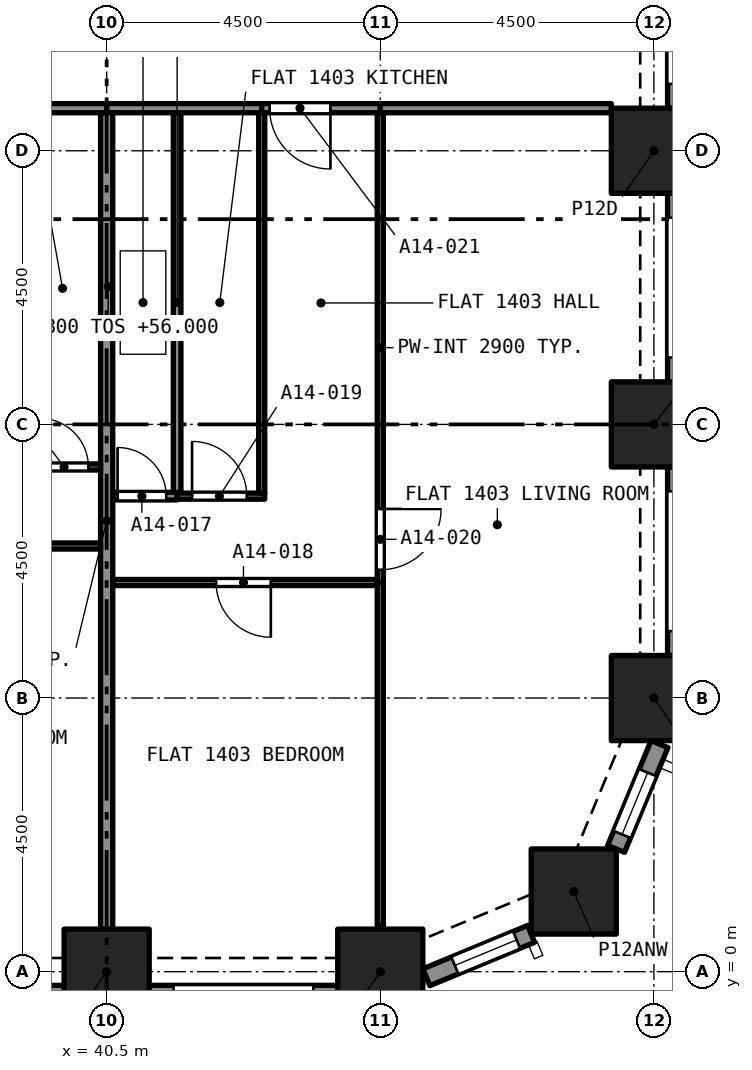
"""IFC4 building model, lengths in metres.
Left out: names, types, materials, properties, quantities, classifications, styles, units other than length and angle.
Written with IfcOpenShell. Run it as: python <this file> out.ifc"""

import sys

from ifc_helpers import new_model, si_unit, direction, frame, frame_2d, origin, origin_2d, place, context, subcontext, project, spatial, rectangle, extrude, element, fill, save


model = new_model("IFC4")
c1 = context("Model", 3, precision=1e-05, world=origin(), true_north=direction((0.0, 1.0)))
c2 = subcontext(c1, "Body", "Model", "MODEL_VIEW")
j1 = project(units=[si_unit("LENGTHUNIT", "METRE"), si_unit("PLANEANGLEUNIT", "RADIAN")], contexts=[c1])
p1 = place(None, origin())
s1 = spatial("IfcSite", under=j1, at=p1, CompositionType="ELEMENT")
p2 = place(p1, origin())
s2 = spatial("IfcBuilding", under=s1, at=p2, CompositionType="ELEMENT")
p3 = place(p2, frame((0.0, 0.0, 56.0)))
s3 = spatial("IfcBuildingStorey", under=s2, at=p3, CompositionType="ELEMENT", Elevation=56.0)
for number, where, z_axis, x_axis in (
    (1, (40.5, 0.0, 0.0), (0.0, 0.0, 1.0), (1.0, 0.0, 0.0)),
    (2, (45.0, 0.0, 0.0), (0.0, 0.0, 1.0), (1.0, 0.0, 0.0)),
    (3, (48.182, 1.318, 0.0), (0.0, 0.0, 1.0), (1.0, 0.0, 0.0)),
    (4, (49.5, 4.5, 0.0), (0.0, 0.0, 1.0), (1.0, 0.0, 0.0)),
    (5, (49.5, 9.0, 0.0), (0.0, 0.0, 1.0), (1.0, 0.0, 0.0)),
    (6, (49.5, 13.5, 0.0), (0.0, 0.0, 1.0), (1.0, 0.0, 0.0)),
):
    element("IfcColumn", number, at=place(p3, frame(where, z_axis=z_axis, x_axis=x_axis)), inside=s3, PredefinedType="COLUMN", context=c2, shape_type="SweptSolid", body=[
        extrude(rectangle(XDim=1.4, YDim=1.4, at=origin_2d()), origin(), (0.0, 0.0, 1.0), 3.2),
    ])
p4 = place(p3, frame((39.8, -0.375, 0.0), z_axis=(0.0, 0.0, 1.0), x_axis=(-1.0, 0.0, 0.0)))
e7 = element("IfcWall", 7, at=p4, inside=s3, PredefinedType="SOLIDWALL", context=c2, shape_type="SweptSolid", body=[
    extrude(rectangle(XDim=3.1, YDim=0.3, at=frame_2d((1.55, 0.0))), origin(), (0.0, 0.0, 1.0), 3.2),
])
p5 = place(p4, frame((0.4, 0.0, 0.45)))
e8 = element("IfcOpeningElement", 8, at=p5, cuts=e7, PredefinedType="OPENING", context=c2, shape_type="SweptSolid", body=[
    extrude(rectangle(XDim=2.3, YDim=1.95, at=frame_2d((1.15, 0.975))), frame((0.0, 0.16, 0.0), z_axis=(0.0, -1.0, 0.0), x_axis=(1.0, 0.0, 0.0)), (0.0, 0.0, 1.0), 0.32),
])
p6 = place(p3, frame((44.3, -0.375, 0.0), z_axis=(0.0, 0.0, 1.0), x_axis=(-1.0, 0.0, 0.0)))
e9 = element("IfcWall", 9, at=p6, inside=s3, PredefinedType="SOLIDWALL", context=c2, shape_type="SweptSolid", body=[
    extrude(rectangle(XDim=3.1, YDim=0.3, at=frame_2d((1.55, 0.0))), origin(), (0.0, 0.0, 1.0), 3.2),
])
p7 = place(p6, frame((0.4, 0.0, 0.45)))
e10 = element("IfcOpeningElement", 10, at=p7, cuts=e9, PredefinedType="OPENING", context=c2, shape_type="SweptSolid", body=[
    extrude(rectangle(XDim=2.3, YDim=1.95, at=frame_2d((1.15, 0.975))), frame((0.0, 0.16, 0.0), z_axis=(0.0, -1.0, 0.0), x_axis=(1.0, 0.0, 0.0)), (0.0, 0.0, 1.0), 0.32),
])
p8 = place(p3, frame((47.48, 0.622, 0.0), z_axis=(0.0, 0.0, 1.0), x_axis=(-0.923903565336, -0.38262540684, 0.0)))
e11 = element("IfcWall", 11, at=p8, inside=s3, PredefinedType="SOLIDWALL", context=c2, shape_type="SweptSolid", body=[
    extrude(rectangle(XDim=1.865, YDim=0.3, at=frame_2d((0.933, 0.0))), origin(), (0.0, 0.0, 1.0), 3.2),
])
p9 = place(p8, frame((0.258, 0.0, 0.45)))
e12 = element("IfcOpeningElement", 12, at=p9, cuts=e11, PredefinedType="OPENING", context=c2, shape_type="SweptSolid", body=[
    extrude(rectangle(XDim=1.1, YDim=1.95, at=frame_2d((0.55, 0.975))), frame((0.0, 0.16, 0.0), z_axis=(0.0, -1.0, 0.0), x_axis=(1.0, 0.0, 0.0)), (0.0, 0.0, 1.0), 0.32),
])
p10 = place(p3, frame((49.592, 3.743, 0.0), z_axis=(0.0, 0.0, 1.0), x_axis=(-0.382737135771, -0.923857286003, 0.0)))
e13 = element("IfcWall", 13, at=p10, inside=s3, PredefinedType="SOLIDWALL", context=c2, shape_type="SweptSolid", body=[
    extrude(rectangle(XDim=1.865, YDim=0.3, at=frame_2d((0.933, 0.0))), origin(), (0.0, 0.0, 1.0), 3.2),
])
p11 = place(p10, frame((0.508, 0.0, 0.45)))
e14 = element("IfcOpeningElement", 14, at=p11, cuts=e13, PredefinedType="OPENING", context=c2, shape_type="SweptSolid", body=[
    extrude(rectangle(XDim=1.1, YDim=1.95, at=frame_2d((0.55, 0.975))), frame((0.0, 0.16, 0.0), z_axis=(0.0, -1.0, 0.0), x_axis=(1.0, 0.0, 0.0)), (0.0, 0.0, 1.0), 0.32),
])
p12 = place(p3, frame((49.875, 8.3, 0.0), z_axis=(0.0, 0.0, 1.0), x_axis=(0.0, -1.0, 0.0)))
e15 = element("IfcWall", 15, at=p12, inside=s3, PredefinedType="SOLIDWALL", context=c2, shape_type="SweptSolid", body=[
    extrude(rectangle(XDim=3.1, YDim=0.3, at=frame_2d((1.55, 0.0))), origin(), (0.0, 0.0, 1.0), 3.2),
])
p13 = place(p12, frame((0.4, 0.0, 0.45)))
e16 = element("IfcOpeningElement", 16, at=p13, cuts=e15, PredefinedType="OPENING", context=c2, shape_type="SweptSolid", body=[
    extrude(rectangle(XDim=2.3, YDim=1.95, at=frame_2d((1.15, 0.975))), frame((0.0, 0.16, 0.0), z_axis=(0.0, -1.0, 0.0), x_axis=(1.0, 0.0, 0.0)), (0.0, 0.0, 1.0), 0.32),
])
p14 = place(p3, frame((49.875, 12.8, 0.0), z_axis=(0.0, 0.0, 1.0), x_axis=(0.0, -1.0, 0.0)))
e17 = element("IfcWall", 17, at=p14, inside=s3, PredefinedType="SOLIDWALL", context=c2, shape_type="SweptSolid", body=[
    extrude(rectangle(XDim=3.1, YDim=0.3, at=frame_2d((1.55, 0.0))), origin(), (0.0, 0.0, 1.0), 3.2),
])
p15 = place(p14, frame((0.4, 0.0, 0.45)))
e18 = element("IfcOpeningElement", 18, at=p15, cuts=e17, PredefinedType="OPENING", context=c2, shape_type="SweptSolid", body=[
    extrude(rectangle(XDim=2.3, YDim=1.95, at=frame_2d((1.15, 0.975))), frame((0.0, 0.16, 0.0), z_axis=(0.0, -1.0, 0.0), x_axis=(1.0, 0.0, 0.0)), (0.0, 0.0, 1.0), 0.32),
])
p16 = place(p3, frame((49.875, 17.3, 0.0), z_axis=(0.0, 0.0, 1.0), x_axis=(0.0, -1.0, 0.0)))
e19 = element("IfcWall", 19, at=p16, inside=s3, PredefinedType="SOLIDWALL", context=c2, shape_type="SweptSolid", body=[
    extrude(rectangle(XDim=3.1, YDim=0.3, at=frame_2d((1.55, 0.0))), origin(), (0.0, 0.0, 1.0), 3.2),
])
p17 = place(p16, frame((0.4, 0.0, 0.45)))
e20 = element("IfcOpeningElement", 20, at=p17, cuts=e19, PredefinedType="OPENING", context=c2, shape_type="SweptSolid", body=[
    extrude(rectangle(XDim=2.3, YDim=1.95, at=frame_2d((1.15, 0.975))), frame((0.0, 0.16, 0.0), z_axis=(0.0, -1.0, 0.0), x_axis=(1.0, 0.0, 0.0)), (0.0, 0.0, 1.0), 0.32),
])
p18 = place(p3, frame((40.6, 7.82, 0.0), z_axis=(0.0, 0.0, 1.0), x_axis=(1.0, 0.0, 0.0)))
e21 = element("IfcWall", 21, at=p18, inside=s3, PredefinedType="PARTITIONING", context=c2, shape_type="SweptSolid", body=[
    extrude(rectangle(XDim=1.059, YDim=0.125, at=frame_2d((0.53, 0.0))), origin(), (0.0, 0.0, 1.0), 2.9),
])
p19 = place(p18, frame((0.08, 0.0, 0.0)))
e22 = element("IfcOpeningElement", 22, at=p19, cuts=e21, PredefinedType="OPENING", context=c2, shape_type="SweptSolid", body=[
    extrude(rectangle(XDim=0.8, YDim=2.1, at=frame_2d((0.4, 1.05))), frame((0.0, 0.073, 0.0), z_axis=(0.0, -1.0, 0.0), x_axis=(1.0, 0.0, 0.0)), (0.0, 0.0, 1.0), 0.145),
])
p20 = place(p3, frame((41.659, 7.883, 0.0), z_axis=(0.0, 0.0, 1.0), x_axis=(0.0, 1.0, 0.0)))
e23 = element("IfcWall", 23, at=p20, inside=s3, PredefinedType="PARTITIONING", context=c2, shape_type="SweptSolid", body=[
    extrude(rectangle(XDim=6.242, YDim=0.125, at=frame_2d((3.121, 0.0))), origin(), (0.0, 0.0, 1.0), 2.9),
])
p21 = place(p3, frame((40.5, 14.2, 0.0), z_axis=(0.0, 0.0, 1.0), x_axis=(1.0, 0.0, 0.0)))
e24 = element("IfcWall", 24, at=p21, inside=s3, PredefinedType="PARTITIONING", context=c2, shape_type="SweptSolid", body=[
    extrude(rectangle(XDim=2.55, YDim=0.15, at=frame_2d((1.275, 0.0))), origin(), (0.0, 0.0, 1.0), 2.9),
])
p22 = place(p3, frame((44.95, 6.4, 0.0), z_axis=(0.0, 0.0, 1.0), x_axis=(-1.0, 0.0, 0.0)))
e25 = element("IfcWall", 25, at=p22, inside=s3, PredefinedType="PARTITIONING", context=c2, shape_type="SweptSolid", body=[
    extrude(rectangle(XDim=4.35, YDim=0.1, at=frame_2d((2.175, 0.0))), origin(), (0.0, 0.0, 1.0), 2.9),
])
p23 = place(p22, frame((1.75, 0.0, 0.0)))
e26 = element("IfcOpeningElement", 26, at=p23, cuts=e25, PredefinedType="OPENING", context=c2, shape_type="SweptSolid", body=[
    extrude(rectangle(XDim=0.9, YDim=2.1, at=frame_2d((0.45, 1.05))), frame((0.0, 0.06, 0.0), z_axis=(0.0, -1.0, 0.0), x_axis=(1.0, 0.0, 0.0)), (0.0, 0.0, 1.0), 0.12),
])
p24 = place(p3, frame((45.0, 0.758, 0.0), z_axis=(0.0, 0.0, 1.0), x_axis=(0.0, 1.0, 0.0)))
e27 = element("IfcWall", 27, at=p24, inside=s3, PredefinedType="PARTITIONING", context=c2, shape_type="SweptSolid", body=[
    extrude(rectangle(XDim=5.642, YDim=0.1, at=frame_2d((2.821, 0.0))), origin(), (0.0, 0.0, 1.0), 2.9),
])
p25 = place(p3, frame((40.5, 0.7, 0.0), z_axis=(0.0, 0.0, 1.0), x_axis=(0.0, 1.0, 0.0)))
e28 = element("IfcWall", 28, at=p25, inside=s3, PredefinedType="PARTITIONING", context=c2, shape_type="SweptSolid", body=[
    extrude(rectangle(XDim=13.425, YDim=0.2, at=frame_2d((6.712, 0.0))), origin(), (0.0, 0.0, 1.0), 2.9),
])
p26 = place(p3, frame((41.659, 7.82, 0.0), z_axis=(0.0, 0.0, 1.0), x_axis=(1.0, 0.0, 0.0)))
e29 = element("IfcWall", 29, at=p26, inside=s3, PredefinedType="PARTITIONING", context=c2, shape_type="SweptSolid", body=[
    extrude(rectangle(XDim=1.441, YDim=0.1, at=frame_2d((0.72, 0.0))), origin(), (0.0, 0.0, 1.0), 2.9),
])
p27 = place(p26, frame((0.246, 0.0, 0.0)))
e30 = element("IfcOpeningElement", 30, at=p27, cuts=e29, PredefinedType="OPENING", context=c2, shape_type="SweptSolid", body=[
    extrude(rectangle(XDim=0.9, YDim=2.1, at=frame_2d((0.45, 1.05))), frame((0.0, 0.06, 0.0), z_axis=(0.0, -1.0, 0.0), x_axis=(1.0, 0.0, 0.0)), (0.0, 0.0, 1.0), 0.12),
])
p28 = place(p3, frame((43.05, 7.87, 0.0), z_axis=(0.0, 0.0, 1.0), x_axis=(0.0, 1.0, 0.0)))
e31 = element("IfcWall", 31, at=p28, inside=s3, PredefinedType="PARTITIONING", context=c2, shape_type="SweptSolid", body=[
    extrude(rectangle(XDim=6.255, YDim=0.1, at=frame_2d((3.127, 0.0))), origin(), (0.0, 0.0, 1.0), 2.9),
])
p29 = place(p3, frame((45.0, 14.125, 0.0), z_axis=(0.0, 0.0, 1.0), x_axis=(0.0, -1.0, 0.0)))
e32 = element("IfcWall", 32, at=p29, inside=s3, PredefinedType="PARTITIONING", context=c2, shape_type="SweptSolid", body=[
    extrude(rectangle(XDim=7.725, YDim=0.1, at=frame_2d((3.863, 0.0))), origin(), (0.0, 0.0, 1.0), 2.9),
])
p30 = place(p29, frame((6.515, 0.0, 0.0)))
e33 = element("IfcOpeningElement", 33, at=p30, cuts=e32, PredefinedType="OPENING", context=c2, shape_type="SweptSolid", body=[
    extrude(rectangle(XDim=1.0, YDim=2.1, at=frame_2d((0.5, 1.05))), frame((0.0, 0.06, 0.0), z_axis=(0.0, -1.0, 0.0), x_axis=(1.0, 0.0, 0.0)), (0.0, 0.0, 1.0), 0.12),
])
p31 = place(p3, frame((45.0, 14.2, 0.0), z_axis=(0.0, 0.0, 1.0), x_axis=(-1.0, 0.0, 0.0)))
e34 = element("IfcWall", 34, at=p31, inside=s3, PredefinedType="PARTITIONING", context=c2, shape_type="SweptSolid", body=[
    extrude(rectangle(XDim=1.95, YDim=0.15, at=frame_2d((0.975, 0.0))), origin(), (0.0, 0.0, 1.0), 2.9),
])
p32 = place(p31, frame((0.82, 0.0, 0.0)))
e35 = element("IfcOpeningElement", 35, at=p32, cuts=e34, PredefinedType="OPENING", context=c2, shape_type="SweptSolid", body=[
    extrude(rectangle(XDim=1.0, YDim=2.1, at=frame_2d((0.5, 1.05))), frame((0.0, 0.085, 0.0), z_axis=(0.0, -1.0, 0.0), x_axis=(1.0, 0.0, 0.0)), (0.0, 0.0, 1.0), 0.17),
])
p33 = place(p3, frame((45.0, 14.2, 0.0), z_axis=(0.0, 0.0, 1.0), x_axis=(1.0, 0.0, 0.0)))
e36 = element("IfcWall", 36, at=p33, inside=s3, PredefinedType="PARTITIONING", context=c2, shape_type="SweptSolid", body=[
    extrude(rectangle(XDim=3.8, YDim=0.15, at=frame_2d((1.9, 0.0))), origin(), (0.0, 0.0, 1.0), 2.9),
])
p34 = place(p3, frame((40.4, 7.0, 0.0), z_axis=(0.0, 0.0, 1.0), x_axis=(-1.0, 0.0, 0.0)))
e37 = element("IfcWall", 37, at=p34, inside=s3, PredefinedType="PARTITIONING", context=c2, shape_type="SweptSolid", body=[
    extrude(rectangle(XDim=4.4, YDim=0.1, at=frame_2d((2.2, 0.0))), origin(), (0.0, 0.0, 1.0), 2.9),
])
p35 = place(p34, frame((1.7, 0.0, 0.0)))
e38 = element("IfcOpeningElement", 38, at=p35, cuts=e37, PredefinedType="OPENING", context=c2, shape_type="SweptSolid", body=[
    extrude(rectangle(XDim=0.9, YDim=2.1, at=frame_2d((0.45, 1.05))), frame((0.0, 0.06, 0.0), z_axis=(0.0, -1.0, 0.0), x_axis=(1.0, 0.0, 0.0)), (0.0, 0.0, 1.0), 0.12),
])
p36 = place(p3, frame((39.099, 8.3, 0.0), z_axis=(0.0, 0.0, 1.0), x_axis=(1.0, 0.0, 0.0)))
e39 = element("IfcWall", 39, at=p36, inside=s3, PredefinedType="PARTITIONING", context=c2, shape_type="SweptSolid", body=[
    extrude(rectangle(XDim=1.301, YDim=0.1, at=frame_2d((0.65, 0.0))), origin(), (0.0, 0.0, 1.0), 2.9),
])
p37 = place(p36, frame((0.3, 0.0, 0.0)))
e40 = element("IfcOpeningElement", 40, at=p37, cuts=e39, PredefinedType="OPENING", context=c2, shape_type="SweptSolid", body=[
    extrude(rectangle(XDim=0.8, YDim=2.1, at=frame_2d((0.4, 1.05))), frame((0.0, 0.06, 0.0), z_axis=(0.0, -1.0, 0.0), x_axis=(1.0, 0.0, 0.0)), (0.0, 0.0, 1.0), 0.12),
])
p38 = place(p3, frame((36.6, 14.2, 0.0), z_axis=(0.0, 0.0, 1.0), x_axis=(1.0, 0.0, 0.0)))
e41 = element("IfcWall", 41, at=p38, inside=s3, PredefinedType="PARTITIONING", context=c2, shape_type="SweptSolid", body=[
    extrude(rectangle(XDim=3.9, YDim=0.15, at=frame_2d((1.95, 0.0))), origin(), (0.0, 0.0, 1.0), 2.9),
])
p39 = place(p9, origin())
e42 = element("IfcWindow", 42, at=p39, inside=s3, PartitioningType="SINGLE_PANEL", PredefinedType="WINDOW", context=c2, shape_type="SweptSolid", body=[
    extrude(rectangle(XDim=1.1, YDim=1.95, at=frame_2d((0.55, 0.975))), frame((0.0, 0.03, 0.0), z_axis=(0.0, -1.0, 0.0), x_axis=(1.0, 0.0, 0.0)), (0.0, 0.0, 1.0), 0.06),
])
fill(e12, e42)
p40 = place(p11, origin())
e43 = element("IfcWindow", 43, at=p40, inside=s3, PartitioningType="SINGLE_PANEL", PredefinedType="WINDOW", context=c2, shape_type="SweptSolid", body=[
    extrude(rectangle(XDim=1.1, YDim=1.95, at=frame_2d((0.55, 0.975))), frame((0.0, 0.03, 0.0), z_axis=(0.0, -1.0, 0.0), x_axis=(1.0, 0.0, 0.0)), (0.0, 0.0, 1.0), 0.06),
])
fill(e14, e43)
p41 = place(p19, origin())
e44 = element("IfcDoor", 44, at=p41, inside=s3, OperationType="SINGLE_SWING_LEFT", PredefinedType="DOOR", context=c2, shape_type="SweptSolid", body=[
    extrude(rectangle(XDim=0.8, YDim=2.1, at=frame_2d((0.4, 1.05))), frame((0.0, 0.025, 0.0), z_axis=(0.0, -1.0, 0.0), x_axis=(1.0, 0.0, 0.0)), (0.0, 0.0, 1.0), 0.05),
])
fill(e22, e44)
p42 = place(p23, origin())
e45 = element("IfcDoor", 45, at=p42, inside=s3, OperationType="SINGLE_SWING_RIGHT", PredefinedType="DOOR", context=c2, shape_type="SweptSolid", body=[
    extrude(rectangle(XDim=0.9, YDim=2.1, at=frame_2d((0.45, 1.05))), frame((0.0, 0.025, 0.0), z_axis=(0.0, -1.0, 0.0), x_axis=(1.0, 0.0, 0.0)), (0.0, 0.0, 1.0), 0.05),
])
fill(e26, e45)
p43 = place(p27, origin())
e46 = element("IfcDoor", 46, at=p43, inside=s3, OperationType="SINGLE_SWING_LEFT", PredefinedType="DOOR", context=c2, shape_type="SweptSolid", body=[
    extrude(rectangle(XDim=0.9, YDim=2.1, at=frame_2d((0.45, 1.05))), frame((0.0, 0.025, 0.0), z_axis=(0.0, -1.0, 0.0), x_axis=(1.0, 0.0, 0.0)), (0.0, 0.0, 1.0), 0.05),
])
fill(e30, e46)
p44 = place(p30, origin())
e47 = element("IfcDoor", 47, at=p44, inside=s3, OperationType="SINGLE_SWING_RIGHT", PredefinedType="DOOR", context=c2, shape_type="SweptSolid", body=[
    extrude(rectangle(XDim=1.0, YDim=2.1, at=frame_2d((0.5, 1.05))), frame((0.0, 0.025, 0.0), z_axis=(0.0, -1.0, 0.0), x_axis=(1.0, 0.0, 0.0)), (0.0, 0.0, 1.0), 0.05),
])
fill(e33, e47)
p45 = place(p32, origin())
e48 = element("IfcDoor", 48, at=p45, inside=s3, OperationType="SINGLE_SWING_RIGHT", PredefinedType="DOOR", context=c2, shape_type="SweptSolid", body=[
    extrude(rectangle(XDim=1.0, YDim=2.1, at=frame_2d((0.5, 1.05))), frame((0.0, 0.025, 0.0), z_axis=(0.0, -1.0, 0.0), x_axis=(1.0, 0.0, 0.0)), (0.0, 0.0, 1.0), 0.05),
])
fill(e35, e48)
p46 = place(p37, origin())
e49 = element("IfcDoor", 49, at=p46, inside=s3, OperationType="SINGLE_SWING_RIGHT", PredefinedType="DOOR", context=c2, shape_type="SweptSolid", body=[
    extrude(rectangle(XDim=0.8, YDim=2.1, at=frame_2d((0.4, 1.05))), frame((0.0, 0.025, 0.0), z_axis=(0.0, -1.0, 0.0), x_axis=(1.0, 0.0, 0.0)), (0.0, 0.0, 1.0), 0.05),
])
fill(e40, e49)
save(model, sys.argv[1])
